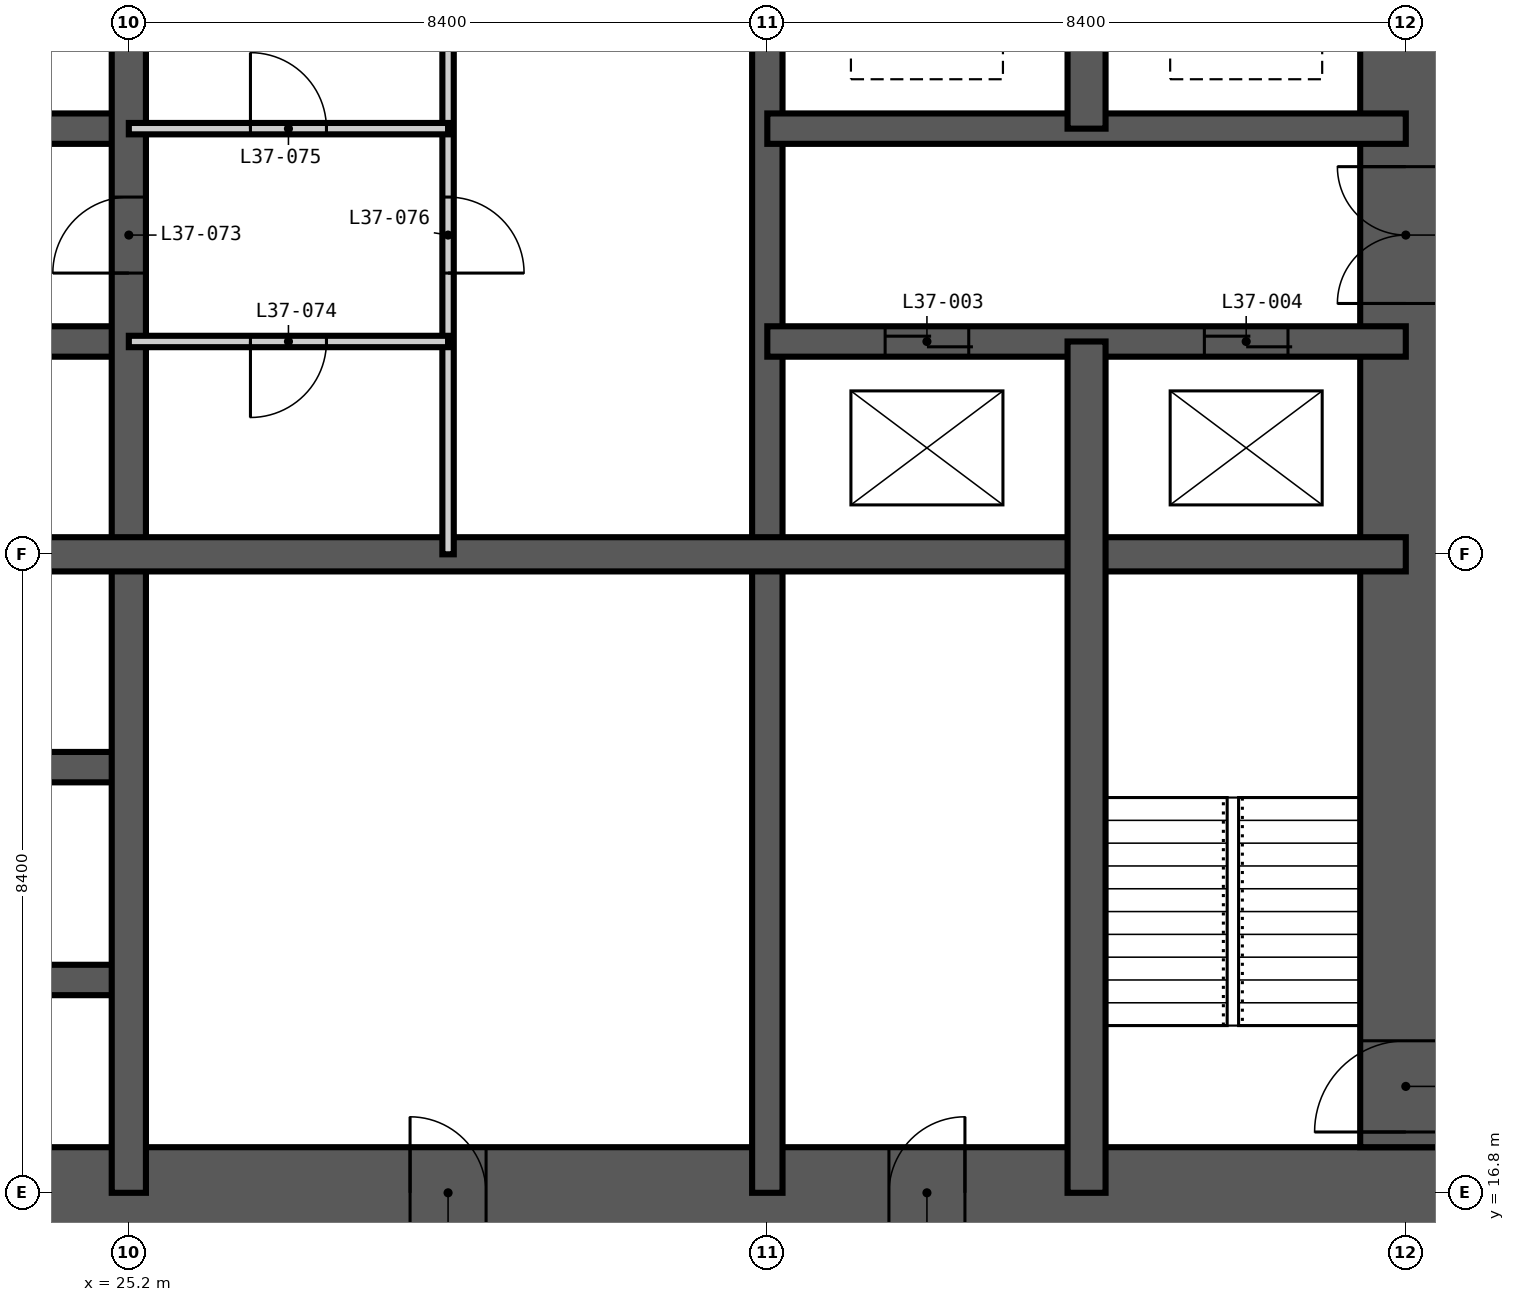
"""IFC4 building model, lengths in metres.
Left out: names, types, materials, properties, quantities, classifications, styles, units other than length and angle.
Written with IfcOpenShell. Run it as: python <this file> out.ifc"""

import sys

from ifc_helpers import new_model, si_unit, direction, frame, frame_2d, origin, place, context, subcontext, project, spatial, rectangle, extrude, element, fill, save


model = new_model("IFC4")
c1 = context("Model", 3, precision=1e-05, world=origin(), true_north=direction((0.0, 1.0)))
c2 = subcontext(c1, "Body", "Model", "MODEL_VIEW")
j1 = project(units=[si_unit("LENGTHUNIT", "METRE"), si_unit("PLANEANGLEUNIT", "RADIAN")], contexts=[c1])
p1 = place(None, origin())
s1 = spatial("IfcSite", under=j1, at=p1, CompositionType="ELEMENT")
p2 = place(p1, origin())
s2 = spatial("IfcBuilding", under=s1, at=p2, CompositionType="ELEMENT")
p3 = place(p2, frame((0.0, 0.0, 144.0)))
s3 = spatial("IfcBuildingStorey", under=s2, at=p3, CompositionType="ELEMENT", Elevation=144.0)
p4 = place(p3, frame((16.2, 16.8, -0.35), z_axis=(0.0, 0.0, 1.0), x_axis=(1.0, 0.0, 0.0)))
e1 = element("IfcWall", 1, at=p4, inside=s3, PredefinedType="SHEAR", context=c2, shape_type="SweptSolid", body=[
    extrude(rectangle(XDim=26.4, YDim=1.2, at=frame_2d((13.2, 0.0))), origin(), (0.0, 0.0, 1.0), 3.6),
])
p5 = place(p4, frame((12.7, 0.0, 0.35)))
e2 = element("IfcOpeningElement", 2, at=p5, cuts=e1, PredefinedType="OPENING", context=c2, shape_type="SweptSolid", body=[
    extrude(rectangle(XDim=1.0, YDim=2.1, at=frame_2d((0.5, 1.05))), frame((0.0, 0.61, 0.0), z_axis=(0.0, -1.0, 0.0), x_axis=(1.0, 0.0, 0.0)), (0.0, 0.0, 1.0), 1.22),
])
p6 = place(p4, frame((19.0, 0.0, 0.35)))
e3 = element("IfcOpeningElement", 3, at=p6, cuts=e1, PredefinedType="OPENING", context=c2, shape_type="SweptSolid", body=[
    extrude(rectangle(XDim=1.0, YDim=2.1, at=frame_2d((0.5, 1.05))), frame((0.0, 0.61, 0.0), z_axis=(0.0, -1.0, 0.0), x_axis=(1.0, 0.0, 0.0)), (0.0, 0.0, 1.0), 1.22),
])
p7 = place(p3, frame((42.0, 17.4, -0.35), z_axis=(0.0, 0.0, 1.0), x_axis=(0.0, 1.0, 0.0)))
e4 = element("IfcWall", 4, at=p7, inside=s3, PredefinedType="SHEAR", context=c2, shape_type="SweptSolid", body=[
    extrude(rectangle(XDim=24.0, YDim=1.2, at=frame_2d((12.0, 0.0))), origin(), (0.0, 0.0, 1.0), 3.6),
])
p8 = place(p7, frame((0.2, 0.0, 0.35)))
e5 = element("IfcOpeningElement", 5, at=p8, cuts=e4, PredefinedType="OPENING", context=c2, shape_type="SweptSolid", body=[
    extrude(rectangle(XDim=1.2, YDim=2.2, at=frame_2d((0.6, 1.1))), frame((0.0, 0.61, 0.0), z_axis=(0.0, -1.0, 0.0), x_axis=(1.0, 0.0, 0.0)), (0.0, 0.0, 1.0), 1.22),
])
p9 = place(p7, frame((11.1, 0.0, 0.35)))
e6 = element("IfcOpeningElement", 6, at=p9, cuts=e4, PredefinedType="OPENING", context=c2, shape_type="SweptSolid", body=[
    extrude(rectangle(XDim=1.8, YDim=2.2, at=frame_2d((0.9, 1.1))), frame((0.0, 0.61, 0.0), z_axis=(0.0, -1.0, 0.0), x_axis=(1.0, 0.0, 0.0)), (0.0, 0.0, 1.0), 1.22),
])
p10 = place(p7, frame((19.9, 0.0, 0.35)))
e7 = element("IfcOpeningElement", 7, at=p10, cuts=e4, PredefinedType="OPENING", context=c2, shape_type="SweptSolid", body=[
    extrude(rectangle(XDim=1.0, YDim=2.1, at=frame_2d((0.5, 1.05))), frame((0.0, 0.61, 0.0), z_axis=(0.0, -1.0, 0.0), x_axis=(1.0, 0.0, 0.0)), (0.0, 0.0, 1.0), 1.22),
])
p11 = place(p3, frame((33.6, 16.8, -0.35), z_axis=(0.0, 0.0, 1.0), x_axis=(0.0, 1.0, 0.0)))
e8 = element("IfcWall", 8, at=p11, inside=s3, PredefinedType="SHEAR", context=c2, shape_type="SweptSolid", body=[
    extrude(rectangle(XDim=25.2, YDim=0.4, at=frame_2d((12.6, 0.0))), origin(), (0.0, 0.0, 1.0), 3.6),
])
p12 = place(p11, frame((22.5, 0.0, 0.35)))
e9 = element("IfcOpeningElement", 9, at=p12, cuts=e8, PredefinedType="OPENING", context=c2, shape_type="SweptSolid", body=[
    extrude(rectangle(XDim=1.2, YDim=2.2, at=frame_2d((0.6, 1.1))), frame((0.0, 0.21, 0.0), z_axis=(0.0, -1.0, 0.0), x_axis=(1.0, 0.0, 0.0)), (0.0, 0.0, 1.0), 0.42),
])
p13 = place(p11, frame((18.3, 0.0, 0.35)))
e10 = element("IfcOpeningElement", 10, at=p13, cuts=e8, PredefinedType="OPENING", context=c2, shape_type="SweptSolid", body=[
    extrude(rectangle(XDim=1.2, YDim=2.2, at=frame_2d((0.6, 1.1))), frame((0.0, 0.21, 0.0), z_axis=(0.0, -1.0, 0.0), x_axis=(1.0, 0.0, 0.0)), (0.0, 0.0, 1.0), 0.42),
])
for number, where, z_axis, x_axis in (
    (11, (16.8, 19.6, -0.35), (0.0, 0.0, 1.0), (1.0, 0.0, 0.0)),
    (12, (16.8, 22.4, -0.35), (0.0, 0.0, 1.0), (1.0, 0.0, 0.0)),
):
    element("IfcWall", number, at=place(p3, frame(where, z_axis=z_axis, x_axis=x_axis)), inside=s3, PredefinedType="SHEAR", context=c2, shape_type="SweptSolid", body=[
        extrude(rectangle(XDim=8.4, YDim=0.4, at=frame_2d((4.2, 0.0))), origin(), (0.0, 0.0, 1.0), 3.6),
    ])
p14 = place(p3, frame((16.8, 28.0, -0.35), z_axis=(0.0, 0.0, 1.0), x_axis=(1.0, 0.0, 0.0)))
e13 = element("IfcWall", 13, at=p14, inside=s3, PredefinedType="SHEAR", context=c2, shape_type="SweptSolid", body=[
    extrude(rectangle(XDim=8.4, YDim=0.4, at=frame_2d((4.2, 0.0))), origin(), (0.0, 0.0, 1.0), 3.6),
])
p15 = place(p14, frame((1.55, 0.0, 0.35)))
e14 = element("IfcOpeningElement", 14, at=p15, cuts=e13, PredefinedType="OPENING", context=c2, shape_type="SweptSolid", body=[
    extrude(rectangle(XDim=1.1, YDim=2.2, at=frame_2d((0.55, 1.1))), frame((0.0, 0.21, 0.0), z_axis=(0.0, -1.0, 0.0), x_axis=(1.0, 0.0, 0.0)), (0.0, 0.0, 1.0), 0.42),
])
p16 = place(p14, frame((5.75, 0.0, 0.35)))
e15 = element("IfcOpeningElement", 15, at=p16, cuts=e13, PredefinedType="OPENING", context=c2, shape_type="SweptSolid", body=[
    extrude(rectangle(XDim=1.1, YDim=2.2, at=frame_2d((0.55, 1.1))), frame((0.0, 0.21, 0.0), z_axis=(0.0, -1.0, 0.0), x_axis=(1.0, 0.0, 0.0)), (0.0, 0.0, 1.0), 0.42),
])
p17 = place(p3, frame((33.6, 28.0, -0.35), z_axis=(0.0, 0.0, 1.0), x_axis=(1.0, 0.0, 0.0)))
e16 = element("IfcWall", 16, at=p17, inside=s3, PredefinedType="SHEAR", context=c2, shape_type="SweptSolid", body=[
    extrude(rectangle(XDim=8.4, YDim=0.4, at=frame_2d((4.2, 0.0))), origin(), (0.0, 0.0, 1.0), 3.6),
])
p18 = place(p17, frame((1.55, 0.0, 0.35)))
e17 = element("IfcOpeningElement", 17, at=p18, cuts=e16, PredefinedType="OPENING", context=c2, shape_type="SweptSolid", body=[
    extrude(rectangle(XDim=1.1, YDim=2.2, at=frame_2d((0.55, 1.1))), frame((0.0, 0.21, 0.0), z_axis=(0.0, -1.0, 0.0), x_axis=(1.0, 0.0, 0.0)), (0.0, 0.0, 1.0), 0.42),
])
p19 = place(p17, frame((5.75, 0.0, 0.35)))
e18 = element("IfcOpeningElement", 18, at=p19, cuts=e16, PredefinedType="OPENING", context=c2, shape_type="SweptSolid", body=[
    extrude(rectangle(XDim=1.1, YDim=2.2, at=frame_2d((0.55, 1.1))), frame((0.0, 0.21, 0.0), z_axis=(0.0, -1.0, 0.0), x_axis=(1.0, 0.0, 0.0)), (0.0, 0.0, 1.0), 0.42),
])
p20 = place(p3, frame((16.8, 30.8, -0.35), z_axis=(0.0, 0.0, 1.0), x_axis=(1.0, 0.0, 0.0)))
e19 = element("IfcWall", 19, at=p20, inside=s3, PredefinedType="SHEAR", context=c2, shape_type="SweptSolid", body=[
    extrude(rectangle(XDim=8.4, YDim=0.4, at=frame_2d((4.2, 0.0))), origin(), (0.0, 0.0, 1.0), 3.6),
])
p21 = place(p20, frame((1.55, 0.0, 0.35)))
e20 = element("IfcOpeningElement", 20, at=p21, cuts=e19, PredefinedType="OPENING", context=c2, shape_type="SweptSolid", body=[
    extrude(rectangle(XDim=1.1, YDim=2.2, at=frame_2d((0.55, 1.1))), frame((0.0, 0.21, 0.0), z_axis=(0.0, -1.0, 0.0), x_axis=(1.0, 0.0, 0.0)), (0.0, 0.0, 1.0), 0.42),
])
p22 = place(p20, frame((5.75, 0.0, 0.35)))
e21 = element("IfcOpeningElement", 21, at=p22, cuts=e19, PredefinedType="OPENING", context=c2, shape_type="SweptSolid", body=[
    extrude(rectangle(XDim=1.1, YDim=2.2, at=frame_2d((0.55, 1.1))), frame((0.0, 0.21, 0.0), z_axis=(0.0, -1.0, 0.0), x_axis=(1.0, 0.0, 0.0)), (0.0, 0.0, 1.0), 0.42),
])
p23 = place(p3, frame((33.6, 30.8, -0.35), z_axis=(0.0, 0.0, 1.0), x_axis=(1.0, 0.0, 0.0)))
e22 = element("IfcWall", 22, at=p23, inside=s3, PredefinedType="SHEAR", context=c2, shape_type="SweptSolid", body=[
    extrude(rectangle(XDim=8.4, YDim=0.4, at=frame_2d((4.2, 0.0))), origin(), (0.0, 0.0, 1.0), 3.6),
])
p24 = place(p3, frame((25.2, 16.8, -0.35), z_axis=(0.0, 0.0, 1.0), x_axis=(0.0, 1.0, 0.0)))
e23 = element("IfcWall", 23, at=p24, inside=s3, PredefinedType="SHEAR", context=c2, shape_type="SweptSolid", body=[
    extrude(rectangle(XDim=25.2, YDim=0.45, at=frame_2d((12.6, 0.0))), origin(), (0.0, 0.0, 1.0), 3.6),
])
p25 = place(p24, frame((12.1, 0.0, 0.35)))
e24 = element("IfcOpeningElement", 24, at=p25, cuts=e23, PredefinedType="OPENING", context=c2, shape_type="SweptSolid", body=[
    extrude(rectangle(XDim=1.0, YDim=2.1, at=frame_2d((0.5, 1.05))), frame((0.0, 0.235, 0.0), z_axis=(0.0, -1.0, 0.0), x_axis=(1.0, 0.0, 0.0)), (0.0, 0.0, 1.0), 0.47),
])
p26 = place(p3, frame((16.8, 25.2, -0.35), z_axis=(0.0, 0.0, 1.0), x_axis=(1.0, 0.0, 0.0)))
e25 = element("IfcWall", 25, at=p26, inside=s3, PredefinedType="SHEAR", context=c2, shape_type="SweptSolid", body=[
    extrude(rectangle(XDim=25.2, YDim=0.45, at=frame_2d((12.6, 0.0))), origin(), (0.0, 0.0, 1.0), 3.6),
])
p27 = place(p3, frame((37.8, 16.8, -0.35), z_axis=(0.0, 0.0, 1.0), x_axis=(0.0, 1.0, 0.0)))
e26 = element("IfcWall", 26, at=p27, inside=s3, PredefinedType="SHEAR", context=c2, shape_type="SweptSolid", body=[
    extrude(rectangle(XDim=11.2, YDim=0.5, at=frame_2d((5.6, 0.0))), origin(), (0.0, 0.0, 1.0), 3.6),
])
p28 = place(p3, frame((37.8, 30.8, -0.35), z_axis=(0.0, 0.0, 1.0), x_axis=(0.0, 1.0, 0.0)))
e27 = element("IfcWall", 27, at=p28, inside=s3, PredefinedType="SHEAR", context=c2, shape_type="SweptSolid", body=[
    extrude(rectangle(XDim=2.8, YDim=0.5, at=frame_2d((1.4, 0.0))), origin(), (0.0, 0.0, 1.0), 3.6),
])
p29 = place(p3, frame((29.4, 25.2, 0.0), z_axis=(0.0, 0.0, 1.0), x_axis=(0.0, 1.0, 0.0)))
e28 = element("IfcWall", 28, at=p29, inside=s3, PredefinedType="PARTITIONING", context=c2, shape_type="SweptSolid", body=[
    extrude(rectangle(XDim=8.4, YDim=0.15, at=frame_2d((4.2, 0.0))), origin(), (0.0, 0.0, 1.0), 3.25),
])
p30 = place(p29, frame((3.7, 0.0, 0.0)))
e29 = element("IfcOpeningElement", 29, at=p30, cuts=e28, PredefinedType="OPENING", context=c2, shape_type="SweptSolid", body=[
    extrude(rectangle(XDim=1.0, YDim=2.1, at=frame_2d((0.5, 1.05))), frame((0.0, 0.085, 0.0), z_axis=(0.0, -1.0, 0.0), x_axis=(1.0, 0.0, 0.0)), (0.0, 0.0, 1.0), 0.17),
])
p31 = place(p3, frame((25.2, 28.0, 0.0), z_axis=(0.0, 0.0, 1.0), x_axis=(1.0, 0.0, 0.0)))
e30 = element("IfcWall", 30, at=p31, inside=s3, PredefinedType="PARTITIONING", context=c2, shape_type="SweptSolid", body=[
    extrude(rectangle(XDim=4.2, YDim=0.15, at=frame_2d((2.1, 0.0))), origin(), (0.0, 0.0, 1.0), 3.25),
])
p32 = place(p31, frame((1.6, 0.0, 0.0)))
e31 = element("IfcOpeningElement", 31, at=p32, cuts=e30, PredefinedType="OPENING", context=c2, shape_type="SweptSolid", body=[
    extrude(rectangle(XDim=1.0, YDim=2.1, at=frame_2d((0.5, 1.05))), frame((0.0, 0.085, 0.0), z_axis=(0.0, -1.0, 0.0), x_axis=(1.0, 0.0, 0.0)), (0.0, 0.0, 1.0), 0.17),
])
p33 = place(p3, frame((25.2, 30.8, 0.0), z_axis=(0.0, 0.0, 1.0), x_axis=(1.0, 0.0, 0.0)))
e32 = element("IfcWall", 32, at=p33, inside=s3, PredefinedType="PARTITIONING", context=c2, shape_type="SweptSolid", body=[
    extrude(rectangle(XDim=4.2, YDim=0.15, at=frame_2d((2.1, 0.0))), origin(), (0.0, 0.0, 1.0), 3.25),
])
p34 = place(p33, frame((1.6, 0.0, 0.0)))
e33 = element("IfcOpeningElement", 33, at=p34, cuts=e32, PredefinedType="OPENING", context=c2, shape_type="SweptSolid", body=[
    extrude(rectangle(XDim=1.0, YDim=2.1, at=frame_2d((0.5, 1.05))), frame((0.0, 0.085, 0.0), z_axis=(0.0, -1.0, 0.0), x_axis=(1.0, 0.0, 0.0)), (0.0, 0.0, 1.0), 0.17),
])
p35 = place(p8, origin())
e34 = element("IfcDoor", 34, at=p35, inside=s3, OperationType="SINGLE_SWING_LEFT", PredefinedType="DOOR", context=c2, shape_type="SweptSolid", body=[
    extrude(rectangle(XDim=1.2, YDim=2.2, at=frame_2d((0.6, 1.1))), frame((0.0, 0.025, 0.0), z_axis=(0.0, -1.0, 0.0), x_axis=(1.0, 0.0, 0.0)), (0.0, 0.0, 1.0), 0.05),
])
fill(e5, e34)
p36 = place(p18, origin())
e35 = element("IfcDoor", 35, at=p36, inside=s3, OperationType="DOUBLE_DOOR_SLIDING", PredefinedType="DOOR", context=c2, shape_type="SweptSolid", body=[
    extrude(rectangle(XDim=1.1, YDim=2.2, at=frame_2d((0.55, 1.1))), frame((0.0, 0.025, 0.0), z_axis=(0.0, -1.0, 0.0), x_axis=(1.0, 0.0, 0.0)), (0.0, 0.0, 1.0), 0.05),
])
fill(e17, e35)
p37 = place(p19, origin())
e36 = element("IfcDoor", 36, at=p37, inside=s3, OperationType="DOUBLE_DOOR_SLIDING", PredefinedType="DOOR", context=c2, shape_type="SweptSolid", body=[
    extrude(rectangle(XDim=1.1, YDim=2.2, at=frame_2d((0.55, 1.1))), frame((0.0, 0.025, 0.0), z_axis=(0.0, -1.0, 0.0), x_axis=(1.0, 0.0, 0.0)), (0.0, 0.0, 1.0), 0.05),
])
fill(e18, e36)
p38 = place(p25, origin())
e37 = element("IfcDoor", 37, at=p38, inside=s3, OperationType="SINGLE_SWING_LEFT", PredefinedType="DOOR", context=c2, shape_type="SweptSolid", body=[
    extrude(rectangle(XDim=1.0, YDim=2.1, at=frame_2d((0.5, 1.05))), frame((0.0, 0.025, 0.0), z_axis=(0.0, -1.0, 0.0), x_axis=(1.0, 0.0, 0.0)), (0.0, 0.0, 1.0), 0.05),
])
fill(e24, e37)
p39 = place(p32, frame((1.0, 0.0, 0.0), z_axis=(0.0, 0.0, 1.0), x_axis=(-1.0, 0.0, 0.0)))
e38 = element("IfcDoor", 38, at=p39, inside=s3, OperationType="SINGLE_SWING_RIGHT", PredefinedType="DOOR", context=c2, shape_type="SweptSolid", body=[
    extrude(rectangle(XDim=1.0, YDim=2.1, at=frame_2d((0.5, 1.05))), frame((0.0, 0.025, 0.0), z_axis=(0.0, -1.0, 0.0), x_axis=(1.0, 0.0, 0.0)), (0.0, 0.0, 1.0), 0.05),
])
fill(e31, e38)
p40 = place(p34, origin())
e39 = element("IfcDoor", 39, at=p40, inside=s3, OperationType="SINGLE_SWING_LEFT", PredefinedType="DOOR", context=c2, shape_type="SweptSolid", body=[
    extrude(rectangle(XDim=1.0, YDim=2.1, at=frame_2d((0.5, 1.05))), frame((0.0, 0.025, 0.0), z_axis=(0.0, -1.0, 0.0), x_axis=(1.0, 0.0, 0.0)), (0.0, 0.0, 1.0), 0.05),
])
fill(e33, e39)
p41 = place(p30, frame((1.0, 0.0, 0.0), z_axis=(0.0, 0.0, 1.0), x_axis=(-1.0, 0.0, 0.0)))
e40 = element("IfcDoor", 40, at=p41, inside=s3, OperationType="SINGLE_SWING_RIGHT", PredefinedType="DOOR", context=c2, shape_type="SweptSolid", body=[
    extrude(rectangle(XDim=1.0, YDim=2.1, at=frame_2d((0.5, 1.05))), frame((0.0, 0.025, 0.0), z_axis=(0.0, -1.0, 0.0), x_axis=(1.0, 0.0, 0.0)), (0.0, 0.0, 1.0), 0.05),
])
fill(e29, e40)
p42 = place(p9, origin())
e41 = element("IfcDoor", 41, at=p42, inside=s3, OperationType="DOUBLE_DOOR_DOUBLE_SWING", PredefinedType="DOOR", context=c2, shape_type="SweptSolid", body=[
    extrude(rectangle(XDim=1.8, YDim=2.2, at=frame_2d((0.9, 1.1))), frame((0.0, 0.025, 0.0), z_axis=(0.0, -1.0, 0.0), x_axis=(1.0, 0.0, 0.0)), (0.0, 0.0, 1.0), 0.05),
])
fill(e6, e41)
p43 = place(p5, origin())
e42 = element("IfcDoor", 42, at=p43, inside=s3, OperationType="SINGLE_SWING_LEFT", PredefinedType="DOOR", context=c2, shape_type="SweptSolid", body=[
    extrude(rectangle(XDim=1.0, YDim=2.1, at=frame_2d((0.5, 1.05))), frame((0.0, 0.025, 0.0), z_axis=(0.0, -1.0, 0.0), x_axis=(1.0, 0.0, 0.0)), (0.0, 0.0, 1.0), 0.05),
])
fill(e2, e42)
p44 = place(p6, origin())
e43 = element("IfcDoor", 43, at=p44, inside=s3, OperationType="SINGLE_SWING_RIGHT", PredefinedType="DOOR", context=c2, shape_type="SweptSolid", body=[
    extrude(rectangle(XDim=1.0, YDim=2.1, at=frame_2d((0.5, 1.05))), frame((0.0, 0.025, 0.0), z_axis=(0.0, -1.0, 0.0), x_axis=(1.0, 0.0, 0.0)), (0.0, 0.0, 1.0), 0.05),
])
fill(e3, e43)
save(model, sys.argv[1])
